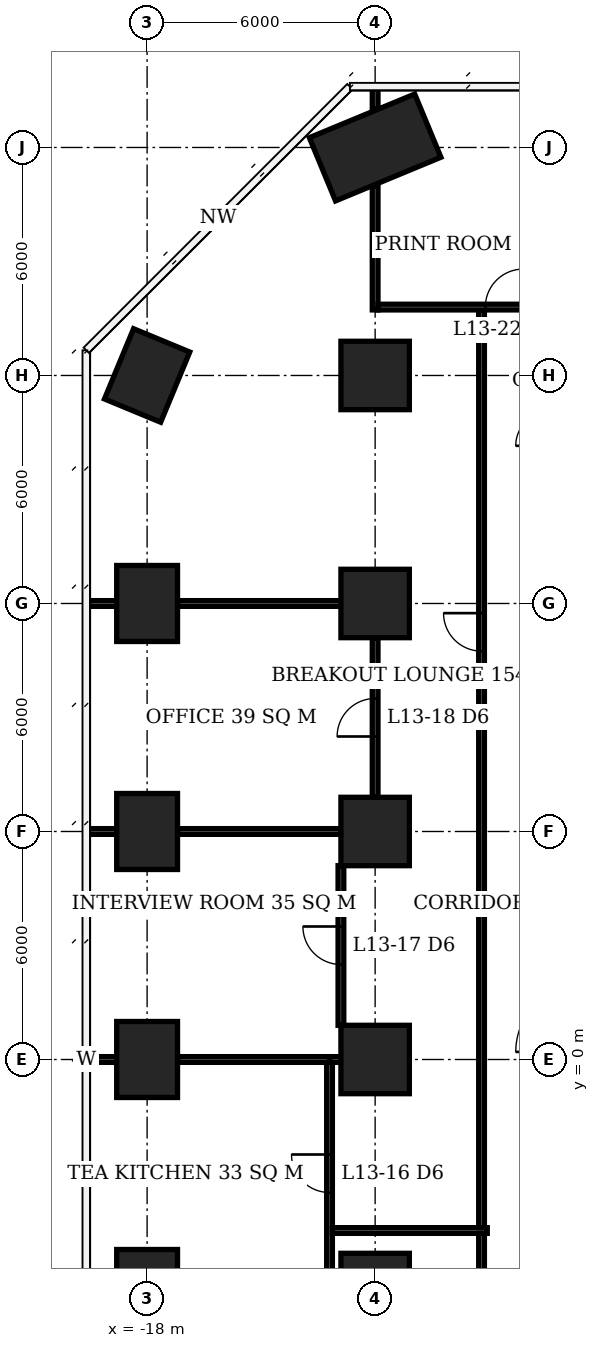
"""IFC4 building model, lengths in metres.
Left out: names, types, materials, properties, quantities, classifications, styles, units other than length and angle.
Written with IfcOpenShell. Run it as: python <this file> out.ifc"""

import sys

from ifc_helpers import new_model, si_unit, direction, frame, frame_2d, origin, origin_2d, place, context, subcontext, project, spatial, rectangle, extrude, element, fill, save


model = new_model("IFC4")
c1 = context("Model", 3, precision=1e-05, world=origin(), true_north=direction((0.0, 1.0)))
c2 = subcontext(c1, "Body", "Model", "MODEL_VIEW")
j1 = project(units=[si_unit("LENGTHUNIT", "METRE"), si_unit("PLANEANGLEUNIT", "RADIAN")], contexts=[c1])
p1 = place(None, origin())
s1 = spatial("IfcSite", under=j1, at=p1, CompositionType="ELEMENT")
p2 = place(p1, origin())
s2 = spatial("IfcBuilding", under=s1, at=p2, CompositionType="ELEMENT")
p3 = place(p2, frame((0.0, 0.0, 57.2)))
s3 = spatial("IfcBuildingStorey", under=s2, at=p3, CompositionType="ELEMENT", Elevation=57.2)
for number, where, z_axis, x_axis in (
    (1, (-18.0, -6.0, 0.0), (0.0, 0.0, 1.0), (0.0, 1.0, 0.0)),
    (2, (-18.0, 0.0, 0.0), (0.0, 0.0, 1.0), (0.0, 1.0, 0.0)),
    (3, (-18.0, 6.0, 0.0), (0.0, 0.0, 1.0), (0.0, 1.0, 0.0)),
    (4, (-18.0, 12.0, 0.0), (0.0, 0.0, 1.0), (0.0, 1.0, 0.0)),
    (5, (-18.0, 18.0, 0.0), (0.0, 0.0, 1.0), (0.383, 0.924, 0.0)),
):
    element("IfcColumn", number, at=place(p3, frame(where, z_axis=z_axis, x_axis=x_axis)), inside=s3, PredefinedType="COLUMN", context=c2, shape_type="SweptSolid", body=[
        extrude(rectangle(XDim=2.0, YDim=1.6, at=origin_2d()), origin(), (0.0, 0.0, 1.0), 3.9),
    ])
for number, where, z_axis, x_axis in (
    (6, (-12.0, -6.0, 0.0), (0.0, 0.0, 1.0), (1.0, 0.0, 0.0)),
    (7, (-12.0, 0.0, 0.0), (0.0, 0.0, 1.0), (1.0, 0.0, 0.0)),
    (8, (-12.0, 6.0, 0.0), (0.0, 0.0, 1.0), (1.0, 0.0, 0.0)),
    (9, (-12.0, 12.0, 0.0), (0.0, 0.0, 1.0), (1.0, 0.0, 0.0)),
    (10, (-12.0, 18.0, 0.0), (0.0, 0.0, 1.0), (1.0, 0.0, 0.0)),
):
    element("IfcColumn", number, at=place(p3, frame(where, z_axis=z_axis, x_axis=x_axis)), inside=s3, PredefinedType="COLUMN", context=c2, shape_type="SweptSolid", body=[
        extrude(rectangle(XDim=1.8, YDim=1.8, at=origin_2d()), origin(), (0.0, 0.0, 1.0), 3.9),
    ])
p4 = place(p3, frame((-12.0, 24.0, 0.0), z_axis=(0.0, 0.0, 1.0), x_axis=(0.923879532511, 0.382683432365, 0.0)))
e11 = element("IfcColumn", 11, at=p4, inside=s3, PredefinedType="COLUMN", context=c2, shape_type="SweptSolid", body=[
    extrude(rectangle(XDim=3.0, YDim=1.8, at=origin_2d()), origin(), (0.0, 0.0, 1.0), 3.9),
])
p5 = place(p3, frame((-19.55, 0.0, 0.0), z_axis=(0.0, 0.0, 1.0), x_axis=(1.0, 0.0, 0.0)))
e12 = element("IfcWall", 12, at=p5, inside=s3, PredefinedType="PARTITIONING", context=c2, shape_type="SweptSolid", body=[
    extrude(rectangle(XDim=0.75, YDim=0.15, at=frame_2d((0.375, 0.0))), origin(), (0.0, 0.0, 1.0), 3.65),
])
p6 = place(p3, frame((-17.2, 0.0, 0.0), z_axis=(0.0, 0.0, 1.0), x_axis=(1.0, 0.0, 0.0)))
e13 = element("IfcWall", 13, at=p6, inside=s3, PredefinedType="PARTITIONING", context=c2, shape_type="SweptSolid", body=[
    extrude(rectangle(XDim=4.075, YDim=0.15, at=frame_2d((2.038, 0.0))), origin(), (0.0, 0.0, 1.0), 3.65),
])
p7 = place(p3, frame((-13.2, 0.0, 0.0), z_axis=(0.0, 0.0, 1.0), x_axis=(1.0, 0.0, 0.0)))
e14 = element("IfcWall", 14, at=p7, inside=s3, PredefinedType="PARTITIONING", context=c2, shape_type="SweptSolid", body=[
    extrude(rectangle(XDim=0.3, YDim=0.15, at=frame_2d((0.15, 0.0))), origin(), (0.0, 0.0, 1.0), 3.65),
])
p8 = place(p3, frame((-19.6, 6.0, 0.0), z_axis=(0.0, 0.0, 1.0), x_axis=(1.0, 0.0, 0.0)))
e15 = element("IfcWall", 15, at=p8, inside=s3, PredefinedType="PARTITIONING", context=c2, shape_type="SweptSolid", body=[
    extrude(rectangle(XDim=0.8, YDim=0.15, at=frame_2d((0.4, 0.0))), origin(), (0.0, 0.0, 1.0), 3.65),
])
p9 = place(p3, frame((-17.2, 6.0, 0.0), z_axis=(0.0, 0.0, 1.0), x_axis=(1.0, 0.0, 0.0)))
e16 = element("IfcWall", 16, at=p9, inside=s3, PredefinedType="PARTITIONING", context=c2, shape_type="SweptSolid", body=[
    extrude(rectangle(XDim=4.3, YDim=0.15, at=frame_2d((2.15, 0.0))), origin(), (0.0, 0.0, 1.0), 3.65),
])
p10 = place(p3, frame((-19.6, 12.0, 0.0), z_axis=(0.0, 0.0, 1.0), x_axis=(1.0, 0.0, 0.0)))
e17 = element("IfcWall", 17, at=p10, inside=s3, PredefinedType="PARTITIONING", context=c2, shape_type="SweptSolid", body=[
    extrude(rectangle(XDim=0.8, YDim=0.15, at=frame_2d((0.4, 0.0))), origin(), (0.0, 0.0, 1.0), 3.65),
])
p11 = place(p3, frame((-17.2, 12.0, 0.0), z_axis=(0.0, 0.0, 1.0), x_axis=(1.0, 0.0, 0.0)))
e18 = element("IfcWall", 18, at=p11, inside=s3, PredefinedType="PARTITIONING", context=c2, shape_type="SweptSolid", body=[
    extrude(rectangle(XDim=4.3, YDim=0.15, at=frame_2d((2.15, 0.0))), origin(), (0.0, 0.0, 1.0), 3.65),
])
p12 = place(p3, frame((-11.925, 19.8, 0.0), z_axis=(0.0, 0.0, 1.0), x_axis=(1.0, 0.0, 0.0)))
e19 = element("IfcWall", 19, at=p12, inside=s3, PredefinedType="PARTITIONING", context=c2, shape_type="SweptSolid", body=[
    extrude(rectangle(XDim=5.85, YDim=0.15, at=frame_2d((2.925, 0.0))), origin(), (0.0, 0.0, 1.0), 3.65),
])
p13 = place(p12, frame((2.825, 0.0, 0.0)))
e20 = element("IfcOpeningElement", 20, at=p13, cuts=e19, PredefinedType="OPENING", context=c2, shape_type="SweptSolid", body=[
    extrude(rectangle(XDim=1.0, YDim=2.1, at=frame_2d((0.5, 1.05))), frame((0.0, 0.085, 0.0), z_axis=(0.0, -1.0, 0.0), x_axis=(1.0, 0.0, 0.0)), (0.0, 0.0, 1.0), 0.17),
])
p14 = place(p3, frame((-13.2, -5.925, 0.0), z_axis=(0.0, 0.0, 1.0), x_axis=(0.0, 1.0, 0.0)))
e21 = element("IfcWall", 21, at=p14, inside=s3, PredefinedType="PARTITIONING", context=c2, shape_type="SweptSolid", body=[
    extrude(rectangle(XDim=5.85, YDim=0.15, at=frame_2d((2.925, 0.0))), origin(), (0.0, 0.0, 1.0), 3.65),
])
p15 = place(p14, frame((2.425, 0.0, 0.0)))
e22 = element("IfcOpeningElement", 22, at=p15, cuts=e21, PredefinedType="OPENING", context=c2, shape_type="SweptSolid", body=[
    extrude(rectangle(XDim=1.0, YDim=2.1, at=frame_2d((0.5, 1.05))), frame((0.0, 0.085, 0.0), z_axis=(0.0, -1.0, 0.0), x_axis=(1.0, 0.0, 0.0)), (0.0, 0.0, 1.0), 0.17),
])
p16 = place(p3, frame((-12.9, 0.9, 0.0), z_axis=(0.0, 0.0, 1.0), x_axis=(0.0, 1.0, 0.0)))
e23 = element("IfcWall", 23, at=p16, inside=s3, PredefinedType="PARTITIONING", context=c2, shape_type="SweptSolid", body=[
    extrude(rectangle(XDim=4.2, YDim=0.15, at=frame_2d((2.1, 0.0))), origin(), (0.0, 0.0, 1.0), 3.65),
])
p17 = place(p16, frame((1.6, 0.0, 0.0)))
e24 = element("IfcOpeningElement", 24, at=p17, cuts=e23, PredefinedType="OPENING", context=c2, shape_type="SweptSolid", body=[
    extrude(rectangle(XDim=1.0, YDim=2.1, at=frame_2d((0.5, 1.05))), frame((0.0, 0.085, 0.0), z_axis=(0.0, -1.0, 0.0), x_axis=(1.0, 0.0, 0.0)), (0.0, 0.0, 1.0), 0.17),
])
p18 = place(p3, frame((-12.0, 6.9, 0.0), z_axis=(0.0, 0.0, 1.0), x_axis=(0.0, 1.0, 0.0)))
e25 = element("IfcWall", 25, at=p18, inside=s3, PredefinedType="PARTITIONING", context=c2, shape_type="SweptSolid", body=[
    extrude(rectangle(XDim=4.2, YDim=0.15, at=frame_2d((2.1, 0.0))), origin(), (0.0, 0.0, 1.0), 3.65),
])
p19 = place(p18, frame((1.6, 0.0, 0.0)))
e26 = element("IfcOpeningElement", 26, at=p19, cuts=e25, PredefinedType="OPENING", context=c2, shape_type="SweptSolid", body=[
    extrude(rectangle(XDim=1.0, YDim=2.1, at=frame_2d((0.5, 1.05))), frame((0.0, 0.085, 0.0), z_axis=(0.0, -1.0, 0.0), x_axis=(1.0, 0.0, 0.0)), (0.0, 0.0, 1.0), 0.17),
])
p20 = place(p3, frame((-12.0, 19.725, 0.0), z_axis=(0.0, 0.0, 1.0), x_axis=(0.0, 1.0, 0.0)))
e27 = element("IfcWall", 27, at=p20, inside=s3, PredefinedType="PARTITIONING", context=c2, shape_type="SweptSolid", body=[
    extrude(rectangle(XDim=3.27, YDim=0.15, at=frame_2d((1.635, 0.0))), origin(), (0.0, 0.0, 1.0), 3.65),
])
p21 = place(p3, frame((-12.0, 25.005, 0.0), z_axis=(0.0, 0.0, 1.0), x_axis=(0.0, 1.0, 0.0)))
e28 = element("IfcWall", 28, at=p21, inside=s3, PredefinedType="PARTITIONING", context=c2, shape_type="SweptSolid", body=[
    extrude(rectangle(XDim=0.595, YDim=0.15, at=frame_2d((0.297, 0.0))), origin(), (0.0, 0.0, 1.0), 3.65),
])
p22 = place(p3, frame((-13.125, -4.5, 0.0), z_axis=(0.0, 0.0, 1.0), x_axis=(1.0, 0.0, 0.0)))
e29 = element("IfcWall", 29, at=p22, inside=s3, PredefinedType="PARTITIONING", context=c2, shape_type="SweptSolid", body=[
    extrude(rectangle(XDim=4.075, YDim=0.15, at=frame_2d((2.038, 0.0))), origin(), (0.0, 0.0, 1.0), 3.65),
])
p23 = place(p3, frame((-9.2, -18.525, 0.0), z_axis=(0.0, 0.0, 1.0), x_axis=(0.0, 1.0, 0.0)))
e30 = element("IfcWall", 30, at=p23, inside=s3, PredefinedType="PARTITIONING", context=c2, shape_type="SweptSolid", body=[
    extrude(rectangle(XDim=13.95, YDim=0.15, at=frame_2d((6.975, 0.0))), origin(), (0.0, 0.0, 1.0), 3.65),
])
p24 = place(p23, frame((4.409, 0.0, 0.0)))
e31 = element("IfcOpeningElement", 31, at=p24, cuts=e30, PredefinedType="OPENING", context=c2, shape_type="SweptSolid", body=[
    extrude(rectangle(XDim=1.0, YDim=2.1, at=frame_2d((0.5, 1.05))), frame((0.0, 0.085, 0.0), z_axis=(0.0, -1.0, 0.0), x_axis=(1.0, 0.0, 0.0)), (0.0, 0.0, 1.0), 0.17),
])
p25 = place(p3, frame((-9.2, -4.425, 0.0), z_axis=(0.0, 0.0, 1.0), x_axis=(0.0, 1.0, 0.0)))
e32 = element("IfcWall", 32, at=p25, inside=s3, PredefinedType="PARTITIONING", context=c2, shape_type="SweptSolid", body=[
    extrude(rectangle(XDim=24.15, YDim=0.15, at=frame_2d((12.075, 0.0))), origin(), (0.0, 0.0, 1.0), 3.65),
])
p26 = place(p25, frame((15.171, 0.0, 0.0)))
e33 = element("IfcOpeningElement", 33, at=p26, cuts=e32, PredefinedType="OPENING", context=c2, shape_type="SweptSolid", body=[
    extrude(rectangle(XDim=1.0, YDim=2.1, at=frame_2d((0.5, 1.05))), frame((0.0, 0.085, 0.0), z_axis=(0.0, -1.0, 0.0), x_axis=(1.0, 0.0, 0.0)), (0.0, 0.0, 1.0), 0.17),
])
p27 = place(p15, origin())
e34 = element("IfcDoor", 34, at=p27, inside=s3, OperationType="SINGLE_SWING_RIGHT", PredefinedType="DOOR", context=c2, shape_type="SweptSolid", body=[
    extrude(rectangle(XDim=1.0, YDim=2.1, at=frame_2d((0.5, 1.05))), frame((0.0, 0.025, 0.0), z_axis=(0.0, -1.0, 0.0), x_axis=(1.0, 0.0, 0.0)), (0.0, 0.0, 1.0), 0.05),
])
fill(e22, e34)
p28 = place(p17, origin())
e35 = element("IfcDoor", 35, at=p28, inside=s3, OperationType="SINGLE_SWING_RIGHT", PredefinedType="DOOR", context=c2, shape_type="SweptSolid", body=[
    extrude(rectangle(XDim=1.0, YDim=2.1, at=frame_2d((0.5, 1.05))), frame((0.0, 0.025, 0.0), z_axis=(0.0, -1.0, 0.0), x_axis=(1.0, 0.0, 0.0)), (0.0, 0.0, 1.0), 0.05),
])
fill(e24, e35)
p29 = place(p19, origin())
e36 = element("IfcDoor", 36, at=p29, inside=s3, OperationType="SINGLE_SWING_LEFT", PredefinedType="DOOR", context=c2, shape_type="SweptSolid", body=[
    extrude(rectangle(XDim=1.0, YDim=2.1, at=frame_2d((0.5, 1.05))), frame((0.0, 0.025, 0.0), z_axis=(0.0, -1.0, 0.0), x_axis=(1.0, 0.0, 0.0)), (0.0, 0.0, 1.0), 0.05),
])
fill(e26, e36)
p30 = place(p13, origin())
e37 = element("IfcDoor", 37, at=p30, inside=s3, OperationType="SINGLE_SWING_RIGHT", PredefinedType="DOOR", context=c2, shape_type="SweptSolid", body=[
    extrude(rectangle(XDim=1.0, YDim=2.1, at=frame_2d((0.5, 1.05))), frame((0.0, 0.025, 0.0), z_axis=(0.0, -1.0, 0.0), x_axis=(1.0, 0.0, 0.0)), (0.0, 0.0, 1.0), 0.05),
])
fill(e20, e37)
p31 = place(p26, origin())
e38 = element("IfcDoor", 38, at=p31, inside=s3, OperationType="SINGLE_SWING_RIGHT", PredefinedType="DOOR", context=c2, shape_type="SweptSolid", body=[
    extrude(rectangle(XDim=1.0, YDim=2.1, at=frame_2d((0.5, 1.05))), frame((0.0, 0.025, 0.0), z_axis=(0.0, -1.0, 0.0), x_axis=(1.0, 0.0, 0.0)), (0.0, 0.0, 1.0), 0.05),
])
fill(e33, e38)
save(model, sys.argv[1])
